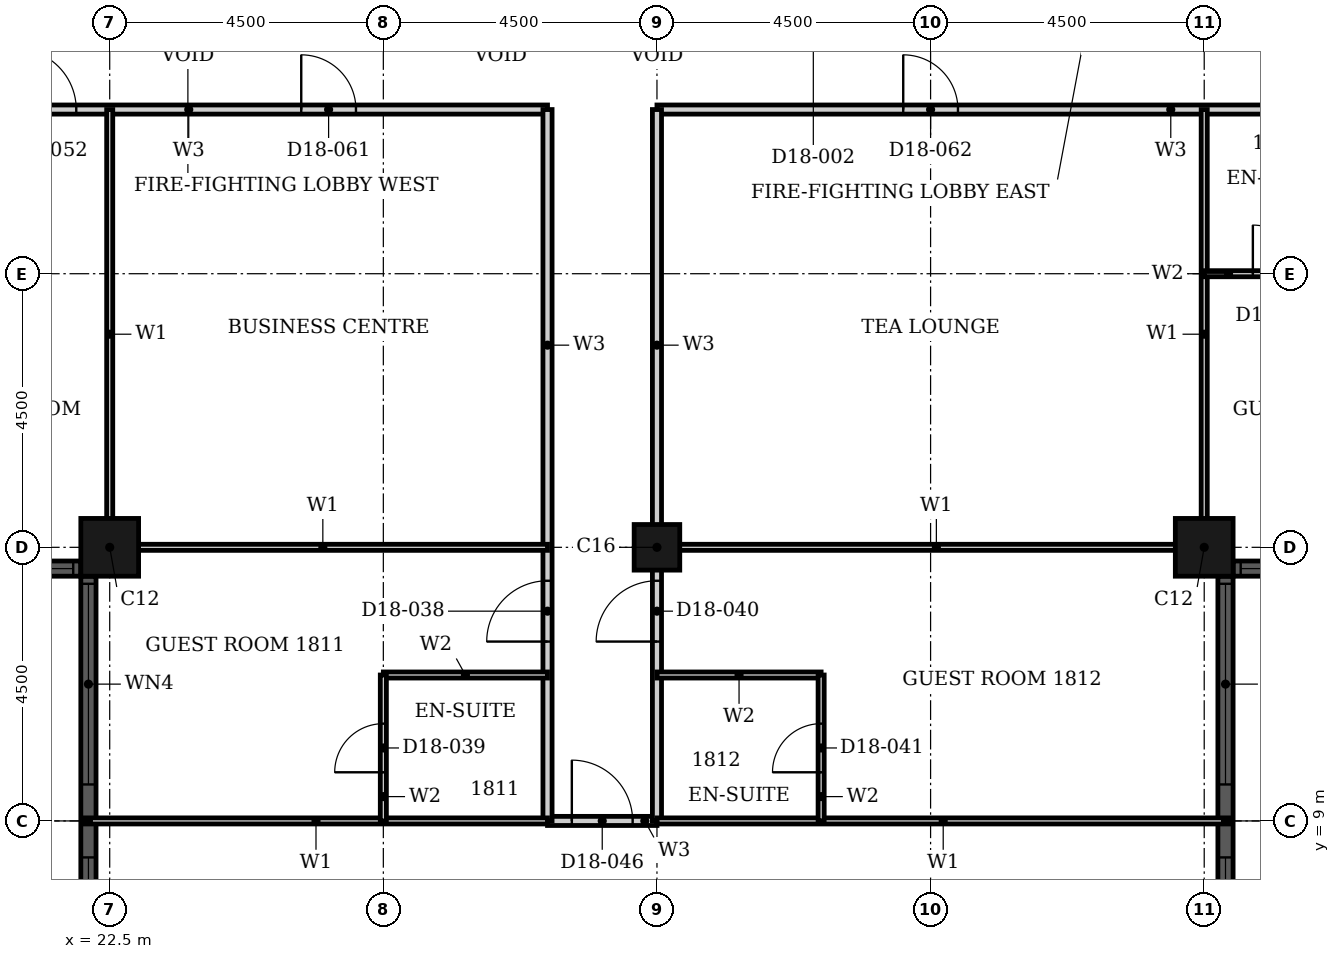
"""IFC4 building model, lengths in metres.
Left out: names, types, materials, properties, quantities, classifications, styles, units other than length and angle.
Written with IfcOpenShell. Run it as: python <this file> out.ifc"""

import sys

from ifc_helpers import new_model, si_unit, direction, frame, frame_2d, origin, origin_2d, place, context, subcontext, project, spatial, rectangle, hollow_rectangle, extrude, element, fill, save


model = new_model("IFC4")
c1 = context("Model", 3, precision=1e-05, world=origin(), true_north=direction((0.0, 1.0)))
c2 = subcontext(c1, "Body", "Model", "MODEL_VIEW")
j1 = project(units=[si_unit("LENGTHUNIT", "METRE"), si_unit("PLANEANGLEUNIT", "RADIAN")], contexts=[c1])
p1 = place(None, origin())
s1 = spatial("IfcSite", under=j1, at=p1, CompositionType="ELEMENT")
p2 = place(p1, origin())
s2 = spatial("IfcBuilding", under=s1, at=p2, CompositionType="ELEMENT")
p3 = place(p2, frame((0.0, 0.0, 78.0)))
s3 = spatial("IfcBuildingStorey", under=s2, at=p3, CompositionType="ELEMENT", Elevation=78.0)
for number, where, z_axis, x_axis in (
    (1, (40.5, 13.5, 0.0), (0.0, 0.0, 1.0), (1.0, 0.0, 0.0)),
    (2, (22.5, 13.5, 0.0), (0.0, 0.0, 1.0), (1.0, 0.0, 0.0)),
):
    element("IfcColumn", number, at=place(p3, frame(where, z_axis=z_axis, x_axis=x_axis)), inside=s3, PredefinedType="COLUMN", context=c2, shape_type="SweptSolid", body=[
        extrude(hollow_rectangle(XDim=0.95, YDim=0.95, WallThickness=0.03, at=origin_2d()), origin(), (0.0, 0.0, 1.0), 3.6),
    ])
p4 = place(p3, frame((31.5, 13.5, 0.0), z_axis=(0.0, 0.0, 1.0), x_axis=(1.0, 0.0, 0.0)))
e3 = element("IfcColumn", 3, at=p4, inside=s3, PredefinedType="COLUMN", context=c2, shape_type="SweptSolid", body=[
    extrude(hollow_rectangle(XDim=0.75, YDim=0.75, WallThickness=0.024, at=origin_2d()), origin(), (0.0, 0.0, 1.0), 3.6),
])
p5 = place(p3, frame((40.85, 4.975, 0.0), z_axis=(0.0, 0.0, 1.0), x_axis=(0.0, 1.0, 0.0)))
e4 = element("IfcWall", 4, at=p5, inside=s3, PredefinedType="SOLIDWALL", context=c2, shape_type="SweptSolid", body=[
    extrude(rectangle(XDim=8.05, YDim=0.25, at=frame_2d((4.025, 0.0))), origin(), (0.0, 0.0, 1.0), 3.6),
])
p6 = place(p5, frame((0.125, 0.0, 0.9)))
e5 = element("IfcOpeningElement", 5, at=p6, cuts=e4, PredefinedType="OPENING", context=c2, shape_type="SweptSolid", body=[
    extrude(rectangle(XDim=3.3, YDim=2.08, at=frame_2d((1.65, 1.04))), frame((0.0, 0.135, 0.0), z_axis=(0.0, -1.0, 0.0), x_axis=(1.0, 0.0, 0.0)), (0.0, 0.0, 1.0), 0.27),
])
p7 = place(p5, frame((4.625, 0.0, 0.9)))
e6 = element("IfcOpeningElement", 6, at=p7, cuts=e4, PredefinedType="OPENING", context=c2, shape_type="SweptSolid", body=[
    extrude(rectangle(XDim=3.3, YDim=2.08, at=frame_2d((1.65, 1.04))), frame((0.0, 0.135, 0.0), z_axis=(0.0, -1.0, 0.0), x_axis=(1.0, 0.0, 0.0)), (0.0, 0.0, 1.0), 0.27),
])
p8 = place(p3, frame((40.975, 13.15, 0.0), z_axis=(0.0, 0.0, 1.0), x_axis=(1.0, 0.0, 0.0)))
e7 = element("IfcWall", 7, at=p8, inside=s3, PredefinedType="SOLIDWALL", context=c2, shape_type="SweptSolid", body=[
    extrude(rectangle(XDim=3.55, YDim=0.25, at=frame_2d((1.775, 0.0))), origin(), (0.0, 0.0, 1.0), 3.6),
])
p9 = place(p8, frame((0.125, 0.0, 0.9)))
e8 = element("IfcOpeningElement", 8, at=p9, cuts=e7, PredefinedType="OPENING", context=c2, shape_type="SweptSolid", body=[
    extrude(rectangle(XDim=3.3, YDim=2.08, at=frame_2d((1.65, 1.04))), frame((0.0, 0.135, 0.0), z_axis=(0.0, -1.0, 0.0), x_axis=(1.0, 0.0, 0.0)), (0.0, 0.0, 1.0), 0.27),
])
p10 = place(p3, frame((18.475, 13.15, 0.0), z_axis=(0.0, 0.0, 1.0), x_axis=(1.0, 0.0, 0.0)))
e9 = element("IfcWall", 9, at=p10, inside=s3, PredefinedType="SOLIDWALL", context=c2, shape_type="SweptSolid", body=[
    extrude(rectangle(XDim=3.55, YDim=0.25, at=frame_2d((1.775, 0.0))), origin(), (0.0, 0.0, 1.0), 3.6),
])
p11 = place(p10, frame((0.125, 0.0, 0.9)))
e10 = element("IfcOpeningElement", 10, at=p11, cuts=e9, PredefinedType="OPENING", context=c2, shape_type="SweptSolid", body=[
    extrude(rectangle(XDim=3.3, YDim=2.08, at=frame_2d((1.65, 1.04))), frame((0.0, 0.135, 0.0), z_axis=(0.0, -1.0, 0.0), x_axis=(1.0, 0.0, 0.0)), (0.0, 0.0, 1.0), 0.27),
])
p12 = place(p3, frame((22.15, 13.025, 0.0), z_axis=(0.0, 0.0, 1.0), x_axis=(0.0, -1.0, 0.0)))
e11 = element("IfcWall", 11, at=p12, inside=s3, PredefinedType="SOLIDWALL", context=c2, shape_type="SweptSolid", body=[
    extrude(rectangle(XDim=8.05, YDim=0.25, at=frame_2d((4.025, 0.0))), origin(), (0.0, 0.0, 1.0), 3.6),
])
p13 = place(p12, frame((0.125, 0.0, 0.9)))
e12 = element("IfcOpeningElement", 12, at=p13, cuts=e11, PredefinedType="OPENING", context=c2, shape_type="SweptSolid", body=[
    extrude(rectangle(XDim=3.3, YDim=2.08, at=frame_2d((1.65, 1.04))), frame((0.0, 0.135, 0.0), z_axis=(0.0, -1.0, 0.0), x_axis=(1.0, 0.0, 0.0)), (0.0, 0.0, 1.0), 0.27),
])
p14 = place(p12, frame((4.625, 0.0, 0.9)))
e13 = element("IfcOpeningElement", 13, at=p14, cuts=e11, PredefinedType="OPENING", context=c2, shape_type="SweptSolid", body=[
    extrude(rectangle(XDim=3.3, YDim=2.08, at=frame_2d((1.65, 1.04))), frame((0.0, 0.135, 0.0), z_axis=(0.0, -1.0, 0.0), x_axis=(1.0, 0.0, 0.0)), (0.0, 0.0, 1.0), 0.27),
])
p15 = place(p3, frame((31.5, 20.7, 0.0), z_axis=(0.0, 0.0, 1.0), x_axis=(1.0, 0.0, 0.0)))
e14 = element("IfcWall", 14, at=p15, inside=s3, PredefinedType="PARTITIONING", context=c2, shape_type="SweptSolid", body=[
    extrude(rectangle(XDim=15.3, YDim=0.15, at=frame_2d((7.65, 0.0))), origin(), (0.0, 0.0, 1.0), 3.3),
])
p16 = place(p15, frame((11.95, 0.0, 0.0)))
e15 = element("IfcOpeningElement", 15, at=p16, cuts=e14, PredefinedType="OPENING", context=c2, shape_type="SweptSolid", body=[
    extrude(rectangle(XDim=1.0, YDim=2.1, at=frame_2d((0.5, 1.05))), frame((0.0, 0.085, 0.0), z_axis=(0.0, -1.0, 0.0), x_axis=(1.0, 0.0, 0.0)), (0.0, 0.0, 1.0), 0.17),
])
p17 = place(p15, frame((13.95, 0.0, 0.0)))
e16 = element("IfcOpeningElement", 16, at=p17, cuts=e14, PredefinedType="OPENING", context=c2, shape_type="SweptSolid", body=[
    extrude(rectangle(XDim=0.9, YDim=2.1, at=frame_2d((0.45, 1.05))), frame((0.0, 0.085, 0.0), z_axis=(0.0, -1.0, 0.0), x_axis=(1.0, 0.0, 0.0)), (0.0, 0.0, 1.0), 0.17),
])
p18 = place(p15, frame((4.05, 0.0, 0.0)))
e17 = element("IfcOpeningElement", 17, at=p18, cuts=e14, PredefinedType="OPENING", context=c2, shape_type="SweptSolid", body=[
    extrude(rectangle(XDim=0.9, YDim=2.1, at=frame_2d((0.45, 1.05))), frame((0.0, 0.085, 0.0), z_axis=(0.0, -1.0, 0.0), x_axis=(1.0, 0.0, 0.0)), (0.0, 0.0, 1.0), 0.17),
])
p19 = place(p3, frame((16.2, 20.7, 0.0), z_axis=(0.0, 0.0, 1.0), x_axis=(1.0, 0.0, 0.0)))
e18 = element("IfcWall", 18, at=p19, inside=s3, PredefinedType="PARTITIONING", context=c2, shape_type="SweptSolid", body=[
    extrude(rectangle(XDim=13.5, YDim=0.15, at=frame_2d((6.75, 0.0))), origin(), (0.0, 0.0, 1.0), 3.3),
])
p20 = place(p19, frame((4.75, 0.0, 0.0)))
e19 = element("IfcOpeningElement", 19, at=p20, cuts=e18, PredefinedType="OPENING", context=c2, shape_type="SweptSolid", body=[
    extrude(rectangle(XDim=1.0, YDim=2.1, at=frame_2d((0.5, 1.05))), frame((0.0, 0.085, 0.0), z_axis=(0.0, -1.0, 0.0), x_axis=(1.0, 0.0, 0.0)), (0.0, 0.0, 1.0), 0.17),
])
p21 = place(p19, frame((0.45, 0.0, 0.0)))
e20 = element("IfcOpeningElement", 20, at=p21, cuts=e18, PredefinedType="OPENING", context=c2, shape_type="SweptSolid", body=[
    extrude(rectangle(XDim=0.9, YDim=2.1, at=frame_2d((0.45, 1.05))), frame((0.0, 0.085, 0.0), z_axis=(0.0, -1.0, 0.0), x_axis=(1.0, 0.0, 0.0)), (0.0, 0.0, 1.0), 0.17),
])
p22 = place(p19, frame((9.45, 0.0, 0.0)))
e21 = element("IfcOpeningElement", 21, at=p22, cuts=e18, PredefinedType="OPENING", context=c2, shape_type="SweptSolid", body=[
    extrude(rectangle(XDim=0.9, YDim=2.1, at=frame_2d((0.45, 1.05))), frame((0.0, 0.085, 0.0), z_axis=(0.0, -1.0, 0.0), x_axis=(1.0, 0.0, 0.0)), (0.0, 0.0, 1.0), 0.17),
])
p23 = place(p3, frame((29.7, 9.0, 0.0), z_axis=(0.0, 0.0, 1.0), x_axis=(1.0, 0.0, 0.0)))
e22 = element("IfcWall", 22, at=p23, inside=s3, PredefinedType="PARTITIONING", context=c2, shape_type="SweptSolid", body=[
    extrude(rectangle(XDim=1.8, YDim=0.15, at=frame_2d((0.9, 0.0))), origin(), (0.0, 0.0, 1.0), 3.3),
])
p24 = place(p23, frame((0.4, 0.0, 0.0)))
e23 = element("IfcOpeningElement", 23, at=p24, cuts=e22, PredefinedType="OPENING", context=c2, shape_type="SweptSolid", body=[
    extrude(rectangle(XDim=1.0, YDim=2.1, at=frame_2d((0.5, 1.05))), frame((0.0, 0.085, 0.0), z_axis=(0.0, -1.0, 0.0), x_axis=(1.0, 0.0, 0.0)), (0.0, 0.0, 1.0), 0.17),
])
p25 = place(p3, frame((29.7, 9.0, 0.0), z_axis=(0.0, 0.0, 1.0), x_axis=(0.0, 1.0, 0.0)))
e24 = element("IfcWall", 24, at=p25, inside=s3, PredefinedType="PARTITIONING", context=c2, shape_type="SweptSolid", body=[
    extrude(rectangle(XDim=11.7, YDim=0.15, at=frame_2d((5.85, 0.0))), origin(), (0.0, 0.0, 1.0), 3.3),
])
p26 = place(p25, frame((2.95, 0.0, 0.0)))
e25 = element("IfcOpeningElement", 25, at=p26, cuts=e24, PredefinedType="OPENING", context=c2, shape_type="SweptSolid", body=[
    extrude(rectangle(XDim=1.0, YDim=2.1, at=frame_2d((0.5, 1.05))), frame((0.0, 0.085, 0.0), z_axis=(0.0, -1.0, 0.0), x_axis=(1.0, 0.0, 0.0)), (0.0, 0.0, 1.0), 0.17),
])
p27 = place(p3, frame((31.5, 9.0, 0.0), z_axis=(0.0, 0.0, 1.0), x_axis=(0.0, 1.0, 0.0)))
e26 = element("IfcWall", 26, at=p27, inside=s3, PredefinedType="PARTITIONING", context=c2, shape_type="SweptSolid", body=[
    extrude(rectangle(XDim=11.7, YDim=0.15, at=frame_2d((5.85, 0.0))), origin(), (0.0, 0.0, 1.0), 2.58),
])
p28 = place(p27, frame((2.95, 0.0, 0.0)))
e27 = element("IfcOpeningElement", 27, at=p28, cuts=e26, PredefinedType="OPENING", context=c2, shape_type="SweptSolid", body=[
    extrude(rectangle(XDim=1.0, YDim=2.1, at=frame_2d((0.5, 1.05))), frame((0.0, 0.085, 0.0), z_axis=(0.0, -1.0, 0.0), x_axis=(1.0, 0.0, 0.0)), (0.0, 0.0, 1.0), 0.17),
])
p29 = place(p3, frame((31.5, 13.5, 0.0), z_axis=(0.0, 0.0, 1.0), x_axis=(1.0, 0.0, 0.0)))
e28 = element("IfcWall", 28, at=p29, inside=s3, PredefinedType="PARTITIONING", context=c2, shape_type="SweptSolid", body=[
    extrude(rectangle(XDim=9.19, YDim=0.1, at=frame_2d((4.595, 0.0))), origin(), (0.0, 0.0, 1.0), 2.38),
])
p30 = place(p3, frame((22.31, 13.5, 0.0), z_axis=(0.0, 0.0, 1.0), x_axis=(1.0, 0.0, 0.0)))
e29 = element("IfcWall", 29, at=p30, inside=s3, PredefinedType="PARTITIONING", context=c2, shape_type="SweptSolid", body=[
    extrude(rectangle(XDim=7.39, YDim=0.1, at=frame_2d((3.695, 0.0))), origin(), (0.0, 0.0, 1.0), 2.38),
])
p31 = place(p3, frame((31.5, 9.0, 0.0), z_axis=(0.0, 0.0, 1.0), x_axis=(1.0, 0.0, 0.0)))
e30 = element("IfcWall", 30, at=p31, inside=s3, PredefinedType="PARTITIONING", context=c2, shape_type="SweptSolid", body=[
    extrude(rectangle(XDim=9.415, YDim=0.1, at=frame_2d((4.708, 0.0))), origin(), (0.0, 0.0, 1.0), 3.3),
])
p32 = place(p3, frame((22.085, 9.0, 0.0), z_axis=(0.0, 0.0, 1.0), x_axis=(1.0, 0.0, 0.0)))
e31 = element("IfcWall", 31, at=p32, inside=s3, PredefinedType="PARTITIONING", context=c2, shape_type="SweptSolid", body=[
    extrude(rectangle(XDim=7.615, YDim=0.1, at=frame_2d((3.808, 0.0))), origin(), (0.0, 0.0, 1.0), 3.3),
])
for number, where, z_axis, x_axis in (
    (32, (22.5, 13.31, 0.0), (0.0, 0.0, 1.0), (0.0, 1.0, 0.0)),
    (33, (40.5, 13.31, 0.0), (0.0, 0.0, 1.0), (0.0, 1.0, 0.0)),
):
    element("IfcWall", number, at=place(p3, frame(where, z_axis=z_axis, x_axis=x_axis)), inside=s3, PredefinedType="PARTITIONING", context=c2, shape_type="SweptSolid", body=[
        extrude(rectangle(XDim=7.39, YDim=0.1, at=frame_2d((3.695, 0.0))), origin(), (0.0, 0.0, 1.0), 3.3),
    ])
for number, where, z_axis, x_axis in (
    (34, (31.5, 11.4, 0.0), (0.0, 0.0, 1.0), (1.0, 0.0, 0.0)),
    (35, (27.0, 11.4, 0.0), (0.0, 0.0, 1.0), (1.0, 0.0, 0.0)),
):
    element("IfcWall", number, at=place(p3, frame(where, z_axis=z_axis, x_axis=x_axis)), inside=s3, PredefinedType="PARTITIONING", context=c2, shape_type="SweptSolid", body=[
        extrude(rectangle(XDim=2.7, YDim=0.1, at=frame_2d((1.35, 0.0))), origin(), (0.0, 0.0, 1.0), 3.3),
    ])
p33 = place(p3, frame((40.5, 18.0, 0.0), z_axis=(0.0, 0.0, 1.0), x_axis=(1.0, 0.0, 0.0)))
e36 = element("IfcWall", 36, at=p33, inside=s3, PredefinedType="PARTITIONING", context=c2, shape_type="SweptSolid", body=[
    extrude(rectangle(XDim=2.4, YDim=0.1, at=frame_2d((1.2, 0.0))), origin(), (0.0, 0.0, 1.0), 3.3),
])
p34 = place(p33, frame((0.8, 0.0, 0.0)))
e37 = element("IfcOpeningElement", 37, at=p34, cuts=e36, PredefinedType="OPENING", context=c2, shape_type="SweptSolid", body=[
    extrude(rectangle(XDim=0.8, YDim=2.1, at=frame_2d((0.4, 1.05))), frame((0.0, 0.06, 0.0), z_axis=(0.0, -1.0, 0.0), x_axis=(1.0, 0.0, 0.0)), (0.0, 0.0, 1.0), 0.12),
])
p35 = place(p3, frame((27.0, 9.0, 0.0), z_axis=(0.0, 0.0, 1.0), x_axis=(0.0, 1.0, 0.0)))
e38 = element("IfcWall", 38, at=p35, inside=s3, PredefinedType="PARTITIONING", context=c2, shape_type="SweptSolid", body=[
    extrude(rectangle(XDim=2.4, YDim=0.1, at=frame_2d((1.2, 0.0))), origin(), (0.0, 0.0, 1.0), 2.58),
])
p36 = place(p35, frame((0.8, 0.0, 0.0)))
e39 = element("IfcOpeningElement", 39, at=p36, cuts=e38, PredefinedType="OPENING", context=c2, shape_type="SweptSolid", body=[
    extrude(rectangle(XDim=0.8, YDim=2.1, at=frame_2d((0.4, 1.05))), frame((0.0, 0.06, 0.0), z_axis=(0.0, -1.0, 0.0), x_axis=(1.0, 0.0, 0.0)), (0.0, 0.0, 1.0), 0.12),
])
p37 = place(p3, frame((34.2, 9.0, 0.0), z_axis=(0.0, 0.0, 1.0), x_axis=(0.0, 1.0, 0.0)))
e40 = element("IfcWall", 40, at=p37, inside=s3, PredefinedType="PARTITIONING", context=c2, shape_type="SweptSolid", body=[
    extrude(rectangle(XDim=2.4, YDim=0.1, at=frame_2d((1.2, 0.0))), origin(), (0.0, 0.0, 1.0), 3.3),
])
p38 = place(p37, frame((0.8, 0.0, 0.0)))
e41 = element("IfcOpeningElement", 41, at=p38, cuts=e40, PredefinedType="OPENING", context=c2, shape_type="SweptSolid", body=[
    extrude(rectangle(XDim=0.8, YDim=2.1, at=frame_2d((0.4, 1.05))), frame((0.0, 0.06, 0.0), z_axis=(0.0, -1.0, 0.0), x_axis=(1.0, 0.0, 0.0)), (0.0, 0.0, 1.0), 0.12),
])
p39 = place(p6, origin())
e42 = element("IfcWindow", 42, at=p39, inside=s3, PartitioningType="SINGLE_PANEL", PredefinedType="WINDOW", context=c2, shape_type="SweptSolid", body=[
    extrude(rectangle(XDim=3.3, YDim=2.08, at=frame_2d((1.65, 1.04))), frame((0.0, 0.03, 0.0), z_axis=(0.0, -1.0, 0.0), x_axis=(1.0, 0.0, 0.0)), (0.0, 0.0, 1.0), 0.06),
])
fill(e5, e42)
p40 = place(p7, origin())
e43 = element("IfcWindow", 43, at=p40, inside=s3, PartitioningType="SINGLE_PANEL", PredefinedType="WINDOW", context=c2, shape_type="SweptSolid", body=[
    extrude(rectangle(XDim=3.3, YDim=2.08, at=frame_2d((1.65, 1.04))), frame((0.0, 0.03, 0.0), z_axis=(0.0, -1.0, 0.0), x_axis=(1.0, 0.0, 0.0)), (0.0, 0.0, 1.0), 0.06),
])
fill(e6, e43)
p41 = place(p9, origin())
e44 = element("IfcWindow", 44, at=p41, inside=s3, PartitioningType="SINGLE_PANEL", PredefinedType="WINDOW", context=c2, shape_type="SweptSolid", body=[
    extrude(rectangle(XDim=3.3, YDim=2.08, at=frame_2d((1.65, 1.04))), frame((0.0, 0.03, 0.0), z_axis=(0.0, -1.0, 0.0), x_axis=(1.0, 0.0, 0.0)), (0.0, 0.0, 1.0), 0.06),
])
fill(e8, e44)
p42 = place(p11, origin())
e45 = element("IfcWindow", 45, at=p42, inside=s3, PartitioningType="SINGLE_PANEL", PredefinedType="WINDOW", context=c2, shape_type="SweptSolid", body=[
    extrude(rectangle(XDim=3.3, YDim=2.08, at=frame_2d((1.65, 1.04))), frame((0.0, 0.03, 0.0), z_axis=(0.0, -1.0, 0.0), x_axis=(1.0, 0.0, 0.0)), (0.0, 0.0, 1.0), 0.06),
])
fill(e10, e45)
p43 = place(p13, origin())
e46 = element("IfcWindow", 46, at=p43, inside=s3, PartitioningType="SINGLE_PANEL", PredefinedType="WINDOW", context=c2, shape_type="SweptSolid", body=[
    extrude(rectangle(XDim=3.3, YDim=2.08, at=frame_2d((1.65, 1.04))), frame((0.0, 0.03, 0.0), z_axis=(0.0, -1.0, 0.0), x_axis=(1.0, 0.0, 0.0)), (0.0, 0.0, 1.0), 0.06),
])
fill(e12, e46)
p44 = place(p14, origin())
e47 = element("IfcWindow", 47, at=p44, inside=s3, PartitioningType="SINGLE_PANEL", PredefinedType="WINDOW", context=c2, shape_type="SweptSolid", body=[
    extrude(rectangle(XDim=3.3, YDim=2.08, at=frame_2d((1.65, 1.04))), frame((0.0, 0.03, 0.0), z_axis=(0.0, -1.0, 0.0), x_axis=(1.0, 0.0, 0.0)), (0.0, 0.0, 1.0), 0.06),
])
fill(e13, e47)
p45 = place(p26, origin())
e48 = element("IfcDoor", 48, at=p45, inside=s3, OperationType="SINGLE_SWING_RIGHT", PredefinedType="DOOR", context=c2, shape_type="SweptSolid", body=[
    extrude(rectangle(XDim=1.0, YDim=2.1, at=frame_2d((0.5, 1.05))), frame((0.0, 0.025, 0.0), z_axis=(0.0, -1.0, 0.0), x_axis=(1.0, 0.0, 0.0)), (0.0, 0.0, 1.0), 0.05),
])
fill(e25, e48)
p46 = place(p36, origin())
e49 = element("IfcDoor", 49, at=p46, inside=s3, OperationType="SINGLE_SWING_LEFT", PredefinedType="DOOR", context=c2, shape_type="SweptSolid", body=[
    extrude(rectangle(XDim=0.8, YDim=2.1, at=frame_2d((0.4, 1.05))), frame((0.0, 0.025, 0.0), z_axis=(0.0, -1.0, 0.0), x_axis=(1.0, 0.0, 0.0)), (0.0, 0.0, 1.0), 0.05),
])
fill(e39, e49)
p47 = place(p28, origin())
e50 = element("IfcDoor", 50, at=p47, inside=s3, OperationType="SINGLE_SWING_RIGHT", PredefinedType="DOOR", context=c2, shape_type="SweptSolid", body=[
    extrude(rectangle(XDim=1.0, YDim=2.1, at=frame_2d((0.5, 1.05))), frame((0.0, 0.025, 0.0), z_axis=(0.0, -1.0, 0.0), x_axis=(1.0, 0.0, 0.0)), (0.0, 0.0, 1.0), 0.05),
])
fill(e27, e50)
p48 = place(p38, origin())
e51 = element("IfcDoor", 51, at=p48, inside=s3, OperationType="SINGLE_SWING_RIGHT", PredefinedType="DOOR", context=c2, shape_type="SweptSolid", body=[
    extrude(rectangle(XDim=0.8, YDim=2.1, at=frame_2d((0.4, 1.05))), frame((0.0, 0.025, 0.0), z_axis=(0.0, -1.0, 0.0), x_axis=(1.0, 0.0, 0.0)), (0.0, 0.0, 1.0), 0.05),
])
fill(e41, e51)
p49 = place(p24, origin())
e52 = element("IfcDoor", 52, at=p49, inside=s3, OperationType="SINGLE_SWING_RIGHT", PredefinedType="DOOR", context=c2, shape_type="SweptSolid", body=[
    extrude(rectangle(XDim=1.0, YDim=2.1, at=frame_2d((0.5, 1.05))), frame((0.0, 0.025, 0.0), z_axis=(0.0, -1.0, 0.0), x_axis=(1.0, 0.0, 0.0)), (0.0, 0.0, 1.0), 0.05),
])
fill(e23, e52)
p50 = place(p20, origin())
e53 = element("IfcDoor", 53, at=p50, inside=s3, OperationType="SINGLE_SWING_RIGHT", PredefinedType="DOOR", context=c2, shape_type="SweptSolid", body=[
    extrude(rectangle(XDim=1.0, YDim=2.1, at=frame_2d((0.5, 1.05))), frame((0.0, 0.025, 0.0), z_axis=(0.0, -1.0, 0.0), x_axis=(1.0, 0.0, 0.0)), (0.0, 0.0, 1.0), 0.05),
])
fill(e19, e53)
p51 = place(p34, origin())
e54 = element("IfcDoor", 54, at=p51, inside=s3, OperationType="SINGLE_SWING_RIGHT", PredefinedType="DOOR", context=c2, shape_type="SweptSolid", body=[
    extrude(rectangle(XDim=0.8, YDim=2.1, at=frame_2d((0.4, 1.05))), frame((0.0, 0.025, 0.0), z_axis=(0.0, -1.0, 0.0), x_axis=(1.0, 0.0, 0.0)), (0.0, 0.0, 1.0), 0.05),
])
fill(e37, e54)
p52 = place(p22, origin())
e55 = element("IfcDoor", 55, at=p52, inside=s3, OperationType="SINGLE_SWING_RIGHT", PredefinedType="DOOR", context=c2, shape_type="SweptSolid", body=[
    extrude(rectangle(XDim=0.9, YDim=2.1, at=frame_2d((0.45, 1.05))), frame((0.0, 0.025, 0.0), z_axis=(0.0, -1.0, 0.0), x_axis=(1.0, 0.0, 0.0)), (0.0, 0.0, 1.0), 0.05),
])
fill(e21, e55)
p53 = place(p18, origin())
e56 = element("IfcDoor", 56, at=p53, inside=s3, OperationType="SINGLE_SWING_LEFT", PredefinedType="DOOR", context=c2, shape_type="SweptSolid", body=[
    extrude(rectangle(XDim=0.9, YDim=2.1, at=frame_2d((0.45, 1.05))), frame((0.0, 0.025, 0.0), z_axis=(0.0, -1.0, 0.0), x_axis=(1.0, 0.0, 0.0)), (0.0, 0.0, 1.0), 0.05),
])
fill(e17, e56)
save(model, sys.argv[1])
